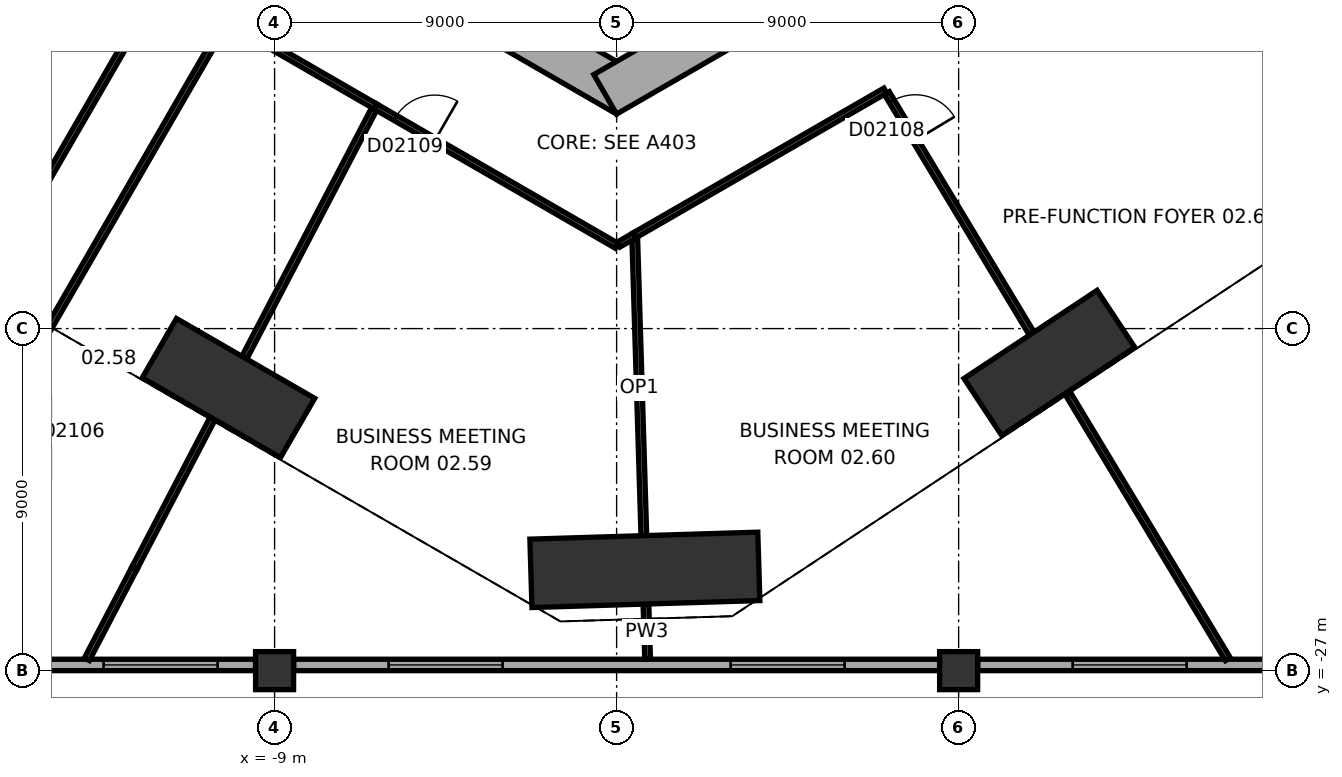
"""IFC4 building model, lengths in metres.
Left out: names, types, materials, properties, quantities, classifications, styles, units other than length and angle.
Written with IfcOpenShell. Run it as: python <this file> out.ifc"""

import sys

from ifc_helpers import new_model, si_unit, direction, frame, frame_2d, origin, origin_2d, place, context, subcontext, project, spatial, rectangle, extrude, element, fill, save


model = new_model("IFC4")
c1 = context("Model", 3, precision=1e-05, world=origin(), true_north=direction((0.0, 1.0)))
c2 = subcontext(c1, "Body", "Model", "MODEL_VIEW")
j1 = project(units=[si_unit("LENGTHUNIT", "METRE"), si_unit("PLANEANGLEUNIT", "RADIAN")], contexts=[c1])
p1 = place(None, origin())
s1 = spatial("IfcSite", under=j1, at=p1, CompositionType="ELEMENT")
p2 = place(p1, origin())
s2 = spatial("IfcBuilding", under=s1, at=p2, CompositionType="ELEMENT")
p3 = place(p2, frame((0.0, 0.0, 13.0)))
s3 = spatial("IfcBuildingStorey", under=s2, at=p3, CompositionType="ELEMENT", Elevation=13.0)
p4 = place(p3, frame((-10.213, -19.564, 0.0), z_axis=(0.0, 0.0, 1.0), x_axis=(0.866028021766, -0.499995465495, 0.0)))
e1 = element("IfcColumn", 1, at=p4, inside=s3, PredefinedType="COLUMN", context=c2, shape_type="SweptSolid", body=[
    extrude(rectangle(XDim=4.2, YDim=1.8, at=origin_2d()), origin(), (0.0, 0.0, 1.0), 8.0),
])
p5 = place(p3, frame((0.744, -24.348, 0.0), z_axis=(0.0, 0.0, 1.0), x_axis=(0.999533484231, 0.03054200224, 0.0)))
e2 = element("IfcColumn", 2, at=p5, inside=s3, PredefinedType="COLUMN", context=c2, shape_type="SweptSolid", body=[
    extrude(rectangle(XDim=6.0, YDim=1.8, at=origin_2d()), origin(), (0.0, 0.0, 1.0), 8.0),
])
p6 = place(p3, frame((11.389, -18.905, 0.0), z_axis=(0.0, 0.0, 1.0), x_axis=(0.833880042151, 0.551945717714, 0.0)))
e3 = element("IfcColumn", 3, at=p6, inside=s3, PredefinedType="COLUMN", context=c2, shape_type="SweptSolid", body=[
    extrude(rectangle(XDim=4.2, YDim=1.8, at=origin_2d()), origin(), (0.0, 0.0, 1.0), 8.0),
])
for number, where, z_axis, x_axis in (
    (4, (-9.0, -27.0, 0.0), (0.0, 0.0, 1.0), (1.0, 0.0, 0.0)),
    (5, (9.0, -27.0, 0.0), (0.0, 0.0, 1.0), (1.0, 0.0, 0.0)),
):
    element("IfcColumn", number, at=place(p3, frame(where, z_axis=z_axis, x_axis=x_axis)), inside=s3, PredefinedType="COLUMN", context=c2, shape_type="SweptSolid", body=[
        extrude(rectangle(XDim=1.0, YDim=1.0, at=origin_2d()), origin(), (0.0, 0.0, 1.0), 8.0),
    ])
p7 = place(p3, frame((-10.4, -5.658, 0.0), z_axis=(0.0, 0.0, 1.0), x_axis=(0.866021384402, -0.500006961711, 0.0)))
e6 = element("IfcWall", 6, at=p7, inside=s3, PredefinedType="SHEAR", context=c2, shape_type="SweptSolid", body=[
    extrude(rectangle(XDim=12.355, YDim=1.2, at=frame_2d((6.178, 0.0))), origin(), (0.0, 0.0, 1.0), 8.0),
])
p8 = place(p7, frame((6.378, 0.0, 0.0)))
e7 = element("IfcOpeningElement", 7, at=p8, cuts=e6, PredefinedType="OPENING", context=c2, shape_type="SweptSolid", body=[
    extrude(rectangle(XDim=1.5, YDim=2.1, at=frame_2d((0.75, 1.05))), frame((0.0, 0.61, 0.0), z_axis=(0.0, -1.0, 0.0), x_axis=(1.0, 0.0, 0.0)), (0.0, 0.0, 1.0), 1.22),
])
p9 = place(p7, frame((1.928, 0.0, 0.0)))
e8 = element("IfcOpeningElement", 8, at=p9, cuts=e6, PredefinedType="OPENING", context=c2, shape_type="SweptSolid", body=[
    extrude(rectangle(XDim=0.9, YDim=2.1, at=frame_2d((0.45, 1.05))), frame((0.0, 0.61, 0.0), z_axis=(0.0, -1.0, 0.0), x_axis=(1.0, 0.0, 0.0)), (0.0, 0.0, 1.0), 1.22),
])
p10 = place(p7, frame((4.528, 0.0, 0.0)))
e9 = element("IfcOpeningElement", 9, at=p10, cuts=e6, PredefinedType="OPENING", context=c2, shape_type="SweptSolid", body=[
    extrude(rectangle(XDim=0.9, YDim=2.1, at=frame_2d((0.45, 1.05))), frame((0.0, 0.61, 0.0), z_axis=(0.0, -1.0, 0.0), x_axis=(1.0, 0.0, 0.0)), (0.0, 0.0, 1.0), 1.22),
])
p11 = place(p3, frame((-0.3, -11.836, 0.0), z_axis=(0.0, 0.0, 1.0), x_axis=(0.866021384402, 0.500006961711, 0.0)))
e10 = element("IfcWall", 10, at=p11, inside=s3, PredefinedType="SHEAR", context=c2, shape_type="SweptSolid", body=[
    extrude(rectangle(XDim=12.355, YDim=1.2, at=frame_2d((6.178, 0.0))), origin(), (0.0, 0.0, 1.0), 8.0),
])
p12 = place(p11, frame((4.128, 0.0, 0.0)))
e11 = element("IfcOpeningElement", 11, at=p12, cuts=e10, PredefinedType="OPENING", context=c2, shape_type="SweptSolid", body=[
    extrude(rectangle(XDim=0.9, YDim=2.1, at=frame_2d((0.45, 1.05))), frame((0.0, 0.61, 0.0), z_axis=(0.0, -1.0, 0.0), x_axis=(1.0, 0.0, 0.0)), (0.0, 0.0, 1.0), 1.22),
])
p13 = place(p11, frame((7.928, 0.0, 0.0)))
e12 = element("IfcOpeningElement", 12, at=p13, cuts=e10, PredefinedType="OPENING", context=c2, shape_type="SweptSolid", body=[
    extrude(rectangle(XDim=1.1, YDim=2.1, at=frame_2d((0.55, 1.05))), frame((0.0, 0.61, 0.0), z_axis=(0.0, -1.0, 0.0), x_axis=(1.0, 0.0, 0.0)), (0.0, 0.0, 1.0), 1.22),
])
p14 = place(p3, frame((-26.5, -26.85, 0.0), z_axis=(0.0, 0.0, 1.0), x_axis=(1.0, 0.0, 0.0)))
e13 = element("IfcWall", 13, at=p14, inside=s3, PredefinedType="STANDARD", context=c2, shape_type="SweptSolid", body=[
    extrude(rectangle(XDim=17.0, YDim=0.3, at=frame_2d((8.5, 0.0))), origin(), (0.0, 0.0, 1.0), 6.5),
])
p15 = place(p14, frame((2.5, 0.0, 1.0)))
e14 = element("IfcOpeningElement", 14, at=p15, cuts=e13, PredefinedType="OPENING", context=c2, shape_type="SweptSolid", body=[
    extrude(rectangle(XDim=3.0, YDim=4.0, at=frame_2d((1.5, 2.0))), frame((0.0, 0.16, 0.0), z_axis=(0.0, -1.0, 0.0), x_axis=(1.0, 0.0, 0.0)), (0.0, 0.0, 1.0), 0.32),
])
p16 = place(p14, frame((13.0, 0.0, 1.0)))
e15 = element("IfcOpeningElement", 15, at=p16, cuts=e13, PredefinedType="OPENING", context=c2, shape_type="SweptSolid", body=[
    extrude(rectangle(XDim=3.0, YDim=4.0, at=frame_2d((1.5, 2.0))), frame((0.0, 0.16, 0.0), z_axis=(0.0, -1.0, 0.0), x_axis=(1.0, 0.0, 0.0)), (0.0, 0.0, 1.0), 0.32),
])
p17 = place(p3, frame((-8.5, -26.85, 0.0), z_axis=(0.0, 0.0, 1.0), x_axis=(1.0, 0.0, 0.0)))
e16 = element("IfcWall", 16, at=p17, inside=s3, PredefinedType="STANDARD", context=c2, shape_type="SweptSolid", body=[
    extrude(rectangle(XDim=17.0, YDim=0.3, at=frame_2d((8.5, 0.0))), origin(), (0.0, 0.0, 1.0), 6.5),
])
p18 = place(p17, frame((2.5, 0.0, 1.0)))
e17 = element("IfcOpeningElement", 17, at=p18, cuts=e16, PredefinedType="OPENING", context=c2, shape_type="SweptSolid", body=[
    extrude(rectangle(XDim=3.0, YDim=4.0, at=frame_2d((1.5, 2.0))), frame((0.0, 0.16, 0.0), z_axis=(0.0, -1.0, 0.0), x_axis=(1.0, 0.0, 0.0)), (0.0, 0.0, 1.0), 0.32),
])
p19 = place(p17, frame((11.5, 0.0, 1.0)))
e18 = element("IfcOpeningElement", 18, at=p19, cuts=e16, PredefinedType="OPENING", context=c2, shape_type="SweptSolid", body=[
    extrude(rectangle(XDim=3.0, YDim=4.0, at=frame_2d((1.5, 2.0))), frame((0.0, 0.16, 0.0), z_axis=(0.0, -1.0, 0.0), x_axis=(1.0, 0.0, 0.0)), (0.0, 0.0, 1.0), 0.32),
])
p20 = place(p3, frame((9.5, -26.85, 0.0), z_axis=(0.0, 0.0, 1.0), x_axis=(1.0, 0.0, 0.0)))
e19 = element("IfcWall", 19, at=p20, inside=s3, PredefinedType="STANDARD", context=c2, shape_type="SweptSolid", body=[
    extrude(rectangle(XDim=17.0, YDim=0.3, at=frame_2d((8.5, 0.0))), origin(), (0.0, 0.0, 1.0), 6.5),
])
p21 = place(p20, frame((2.5, 0.0, 1.0)))
e20 = element("IfcOpeningElement", 20, at=p21, cuts=e19, PredefinedType="OPENING", context=c2, shape_type="SweptSolid", body=[
    extrude(rectangle(XDim=3.0, YDim=4.0, at=frame_2d((1.5, 2.0))), frame((0.0, 0.16, 0.0), z_axis=(0.0, -1.0, 0.0), x_axis=(1.0, 0.0, 0.0)), (0.0, 0.0, 1.0), 0.32),
])
p22 = place(p20, frame((11.5, 0.0, 1.0)))
e21 = element("IfcOpeningElement", 21, at=p22, cuts=e19, PredefinedType="OPENING", context=c2, shape_type="SweptSolid", body=[
    extrude(rectangle(XDim=3.0, YDim=4.0, at=frame_2d((1.5, 2.0))), frame((0.0, 0.16, 0.0), z_axis=(0.0, -1.0, 0.0), x_axis=(1.0, 0.0, 0.0)), (0.0, 0.0, 1.0), 0.32),
])
p23 = place(p3, frame((0.771, -25.248, 0.0), z_axis=(0.0, 0.0, 1.0), x_axis=(0.030584206332, -0.99953219374, 0.0)))
e22 = element("IfcWall", 22, at=p23, inside=s3, PredefinedType="PARTITIONING", context=c2, shape_type="SweptSolid", body=[
    extrude(rectangle(XDim=1.453, YDim=0.15, at=frame_2d((0.727, 0.0))), origin(), (0.0, 0.0, 1.0), 7.7),
])
p24 = place(p3, frame((-12.686, -24.3, 0.0), z_axis=(0.0, 0.0, 1.0), x_axis=(-0.462800215564, -0.886462610872, 0.0)))
e23 = element("IfcWall", 23, at=p24, inside=s3, PredefinedType="PARTITIONING", context=c2, shape_type="SweptSolid", body=[
    extrude(rectangle(XDim=2.707, YDim=0.15, at=frame_2d((1.354, 0.0))), origin(), (0.0, 0.0, 1.0), 7.7),
])
p25 = place(p3, frame((-12.686, -24.3, 0.0), z_axis=(0.0, 0.0, 1.0), x_axis=(0.462800821993, 0.88646229427, 0.0)))
e24 = element("IfcWall", 24, at=p25, inside=s3, PredefinedType="PARTITIONING", context=c2, shape_type="SweptSolid", body=[
    extrude(rectangle(XDim=4.441, YDim=0.15, at=frame_2d((2.221, 0.0))), origin(), (0.0, 0.0, 1.0), 7.7),
])
p26 = place(p3, frame((11.879, -19.719, 0.0), z_axis=(0.0, 0.0, 1.0), x_axis=(0.516054476578, -0.856555764212, 0.0)))
e25 = element("IfcWall", 25, at=p26, inside=s3, PredefinedType="PARTITIONING", context=c2, shape_type="SweptSolid", body=[
    extrude(rectangle(XDim=8.149, YDim=0.15, at=frame_2d((4.075, 0.0))), origin(), (0.0, 0.0, 1.0), 7.7),
])
p27 = place(p3, frame((-18.021, -19.321, 0.0), z_axis=(0.0, 0.0, 1.0), x_axis=(0.500403049961, 0.865792577694, 0.0)))
e26 = element("IfcWall", 26, at=p27, inside=s3, PredefinedType="PARTITIONING", context=c2, shape_type="SweptSolid", body=[
    extrude(rectangle(XDim=11.963, YDim=0.15, at=frame_2d((5.982, 0.0))), origin(), (0.0, 0.0, 1.0), 7.7),
])
p28 = place(p27, frame((0.25, 0.0, 0.0)))
e27 = element("IfcOpeningElement", 27, at=p28, cuts=e26, PredefinedType="OPENING", context=c2, shape_type="SweptSolid", body=[
    extrude(rectangle(XDim=1.2, YDim=2.1, at=frame_2d((0.6, 1.05))), frame((0.0, 0.085, 0.0), z_axis=(0.0, -1.0, 0.0), x_axis=(1.0, 0.0, 0.0)), (0.0, 0.0, 1.0), 0.17),
])
p29 = place(p3, frame((-9.796, -18.766, 0.0), z_axis=(0.0, 0.0, 1.0), x_axis=(0.462793341808, 0.886466199456, 0.0)))
e28 = element("IfcWall", 28, at=p29, inside=s3, PredefinedType="PARTITIONING", context=c2, shape_type="SweptSolid", body=[
    extrude(rectangle(XDim=7.376, YDim=0.15, at=frame_2d((3.688, 0.0))), origin(), (0.0, 0.0, 1.0), 7.7),
])
p30 = place(p3, frame((10.924, -18.133, 0.0), z_axis=(0.0, 0.0, 1.0), x_axis=(-0.516035715917, 0.856567066784, 0.0)))
e29 = element("IfcWall", 29, at=p30, inside=s3, PredefinedType="PARTITIONING", context=c2, shape_type="SweptSolid", body=[
    extrude(rectangle(XDim=7.387, YDim=0.15, at=frame_2d((3.693, 0.0))), origin(), (0.0, 0.0, 1.0), 7.7),
])
p31 = place(p30, frame((5.937, 0.0, 0.0)))
e30 = element("IfcOpeningElement", 30, at=p31, cuts=e29, PredefinedType="OPENING", context=c2, shape_type="SweptSolid", body=[
    extrude(rectangle(XDim=1.2, YDim=2.1, at=frame_2d((0.6, 1.05))), frame((0.0, 0.085, 0.0), z_axis=(0.0, -1.0, 0.0), x_axis=(1.0, 0.0, 0.0)), (0.0, 0.0, 1.0), 0.17),
])
p32 = place(p3, frame((0.0, -15.82, 0.0), z_axis=(0.0, 0.0, 1.0), x_axis=(-0.866018019704, 0.500012789385, 0.0)))
e31 = element("IfcWall", 31, at=p32, inside=s3, PredefinedType="PARTITIONING", context=c2, shape_type="SweptSolid", body=[
    extrude(rectangle(XDim=7.327, YDim=0.15, at=frame_2d((3.664, 0.0))), origin(), (0.0, 0.0, 1.0), 7.7),
])
p33 = place(p32, frame((5.527, 0.0, 0.0)))
e32 = element("IfcOpeningElement", 32, at=p33, cuts=e31, PredefinedType="OPENING", context=c2, shape_type="SweptSolid", body=[
    extrude(rectangle(XDim=1.2, YDim=2.1, at=frame_2d((0.6, 1.05))), frame((0.0, 0.085, 0.0), z_axis=(0.0, -1.0, 0.0), x_axis=(1.0, 0.0, 0.0)), (0.0, 0.0, 1.0), 0.17),
])
p34 = place(p3, frame((0.479, -15.665, 0.0), z_axis=(0.0, 0.0, 1.0), x_axis=(0.030535907252, -0.999533670453, 0.0)))
e33 = element("IfcWall", 33, at=p34, inside=s3, PredefinedType="MOVABLE", context=c2, shape_type="SweptSolid", body=[
    extrude(rectangle(XDim=7.787, YDim=0.15, at=frame_2d((3.894, 0.0))), origin(), (0.0, 0.0, 1.0), 7.7),
])
p35 = place(p3, frame((0.475, -15.545, 0.0), z_axis=(0.0, 0.0, 1.0), x_axis=(0.866021168401, 0.500007335828, 0.0)))
e34 = element("IfcWall", 34, at=p35, inside=s3, PredefinedType="PARTITIONING", context=c2, shape_type="SweptSolid", body=[
    extrude(rectangle(XDim=7.616, YDim=0.15, at=frame_2d((3.808, 0.0))), origin(), (0.0, 0.0, 1.0), 7.7),
])
p36 = place(p3, frame((0.475, -15.545, 0.0), z_axis=(0.0, 0.0, 1.0), x_axis=(-0.865927594567, -0.50016937228, 0.0)))
e35 = element("IfcWall", 35, at=p36, inside=s3, PredefinedType="PARTITIONING", context=c2, shape_type="SweptSolid", body=[
    extrude(rectangle(XDim=0.489, YDim=0.15, at=frame_2d((0.244, 0.0))), origin(), (0.0, 0.0, 1.0), 7.7),
])
p37 = place(p3, frame((-6.346, -12.156, 0.0), z_axis=(0.0, 0.0, 1.0), x_axis=(-0.866015706063, 0.50001679657, 0.0)))
e36 = element("IfcWall", 36, at=p37, inside=s3, PredefinedType="PARTITIONING", context=c2, shape_type="SweptSolid", body=[
    extrude(rectangle(XDim=4.523, YDim=0.15, at=frame_2d((2.262, 0.0))), origin(), (0.0, 0.0, 1.0), 7.7),
])
p38 = place(p3, frame((-19.293, -11.939, 0.0), z_axis=(0.0, 0.0, 1.0), x_axis=(0.85034374829, 0.526227621609, 0.0)))
e37 = element("IfcWall", 37, at=p38, inside=s3, PredefinedType="PARTITIONING", context=c2, shape_type="SweptSolid", body=[
    extrude(rectangle(XDim=7.016, YDim=0.15, at=frame_2d((3.508, 0.0))), origin(), (0.0, 0.0, 1.0), 7.7),
])
p39 = place(p3, frame((-10.303, -9.963, 0.0), z_axis=(0.0, 0.0, 1.0), x_axis=(-0.500409628778, -0.865788775295, 0.0)))
e38 = element("IfcWall", 38, at=p39, inside=s3, PredefinedType="PARTITIONING", context=c2, shape_type="SweptSolid", body=[
    extrude(rectangle(XDim=11.275, YDim=0.15, at=frame_2d((5.637, 0.0))), origin(), (0.0, 0.0, 1.0), 7.7),
])
p40 = place(p16, origin())
e39 = element("IfcWindow", 39, at=p40, inside=s3, PartitioningType="SINGLE_PANEL", PredefinedType="WINDOW", context=c2, shape_type="SweptSolid", body=[
    extrude(rectangle(XDim=3.0, YDim=4.0, at=frame_2d((1.5, 2.0))), frame((0.0, 0.03, 0.0), z_axis=(0.0, -1.0, 0.0), x_axis=(1.0, 0.0, 0.0)), (0.0, 0.0, 1.0), 0.06),
])
fill(e15, e39)
p41 = place(p18, origin())
e40 = element("IfcWindow", 40, at=p41, inside=s3, PartitioningType="SINGLE_PANEL", PredefinedType="WINDOW", context=c2, shape_type="SweptSolid", body=[
    extrude(rectangle(XDim=3.0, YDim=4.0, at=frame_2d((1.5, 2.0))), frame((0.0, 0.03, 0.0), z_axis=(0.0, -1.0, 0.0), x_axis=(1.0, 0.0, 0.0)), (0.0, 0.0, 1.0), 0.06),
])
fill(e17, e40)
p42 = place(p19, origin())
e41 = element("IfcWindow", 41, at=p42, inside=s3, PartitioningType="SINGLE_PANEL", PredefinedType="WINDOW", context=c2, shape_type="SweptSolid", body=[
    extrude(rectangle(XDim=3.0, YDim=4.0, at=frame_2d((1.5, 2.0))), frame((0.0, 0.03, 0.0), z_axis=(0.0, -1.0, 0.0), x_axis=(1.0, 0.0, 0.0)), (0.0, 0.0, 1.0), 0.06),
])
fill(e18, e41)
p43 = place(p21, origin())
e42 = element("IfcWindow", 42, at=p43, inside=s3, PartitioningType="SINGLE_PANEL", PredefinedType="WINDOW", context=c2, shape_type="SweptSolid", body=[
    extrude(rectangle(XDim=3.0, YDim=4.0, at=frame_2d((1.5, 2.0))), frame((0.0, 0.03, 0.0), z_axis=(0.0, -1.0, 0.0), x_axis=(1.0, 0.0, 0.0)), (0.0, 0.0, 1.0), 0.06),
])
fill(e20, e42)
p44 = place(p31, origin())
e43 = element("IfcDoor", 43, at=p44, inside=s3, OperationType="SINGLE_SWING_LEFT", PredefinedType="DOOR", context=c2, shape_type="SweptSolid", body=[
    extrude(rectangle(XDim=1.2, YDim=2.1, at=frame_2d((0.6, 1.05))), frame((0.0, 0.025, 0.0), z_axis=(0.0, -1.0, 0.0), x_axis=(1.0, 0.0, 0.0)), (0.0, 0.0, 1.0), 0.05),
])
fill(e30, e43)
p45 = place(p33, origin())
e44 = element("IfcDoor", 44, at=p45, inside=s3, OperationType="SINGLE_SWING_LEFT", PredefinedType="DOOR", context=c2, shape_type="SweptSolid", body=[
    extrude(rectangle(XDim=1.2, YDim=2.1, at=frame_2d((0.6, 1.05))), frame((0.0, 0.025, 0.0), z_axis=(0.0, -1.0, 0.0), x_axis=(1.0, 0.0, 0.0)), (0.0, 0.0, 1.0), 0.05),
])
fill(e32, e44)
save(model, sys.argv[1])
